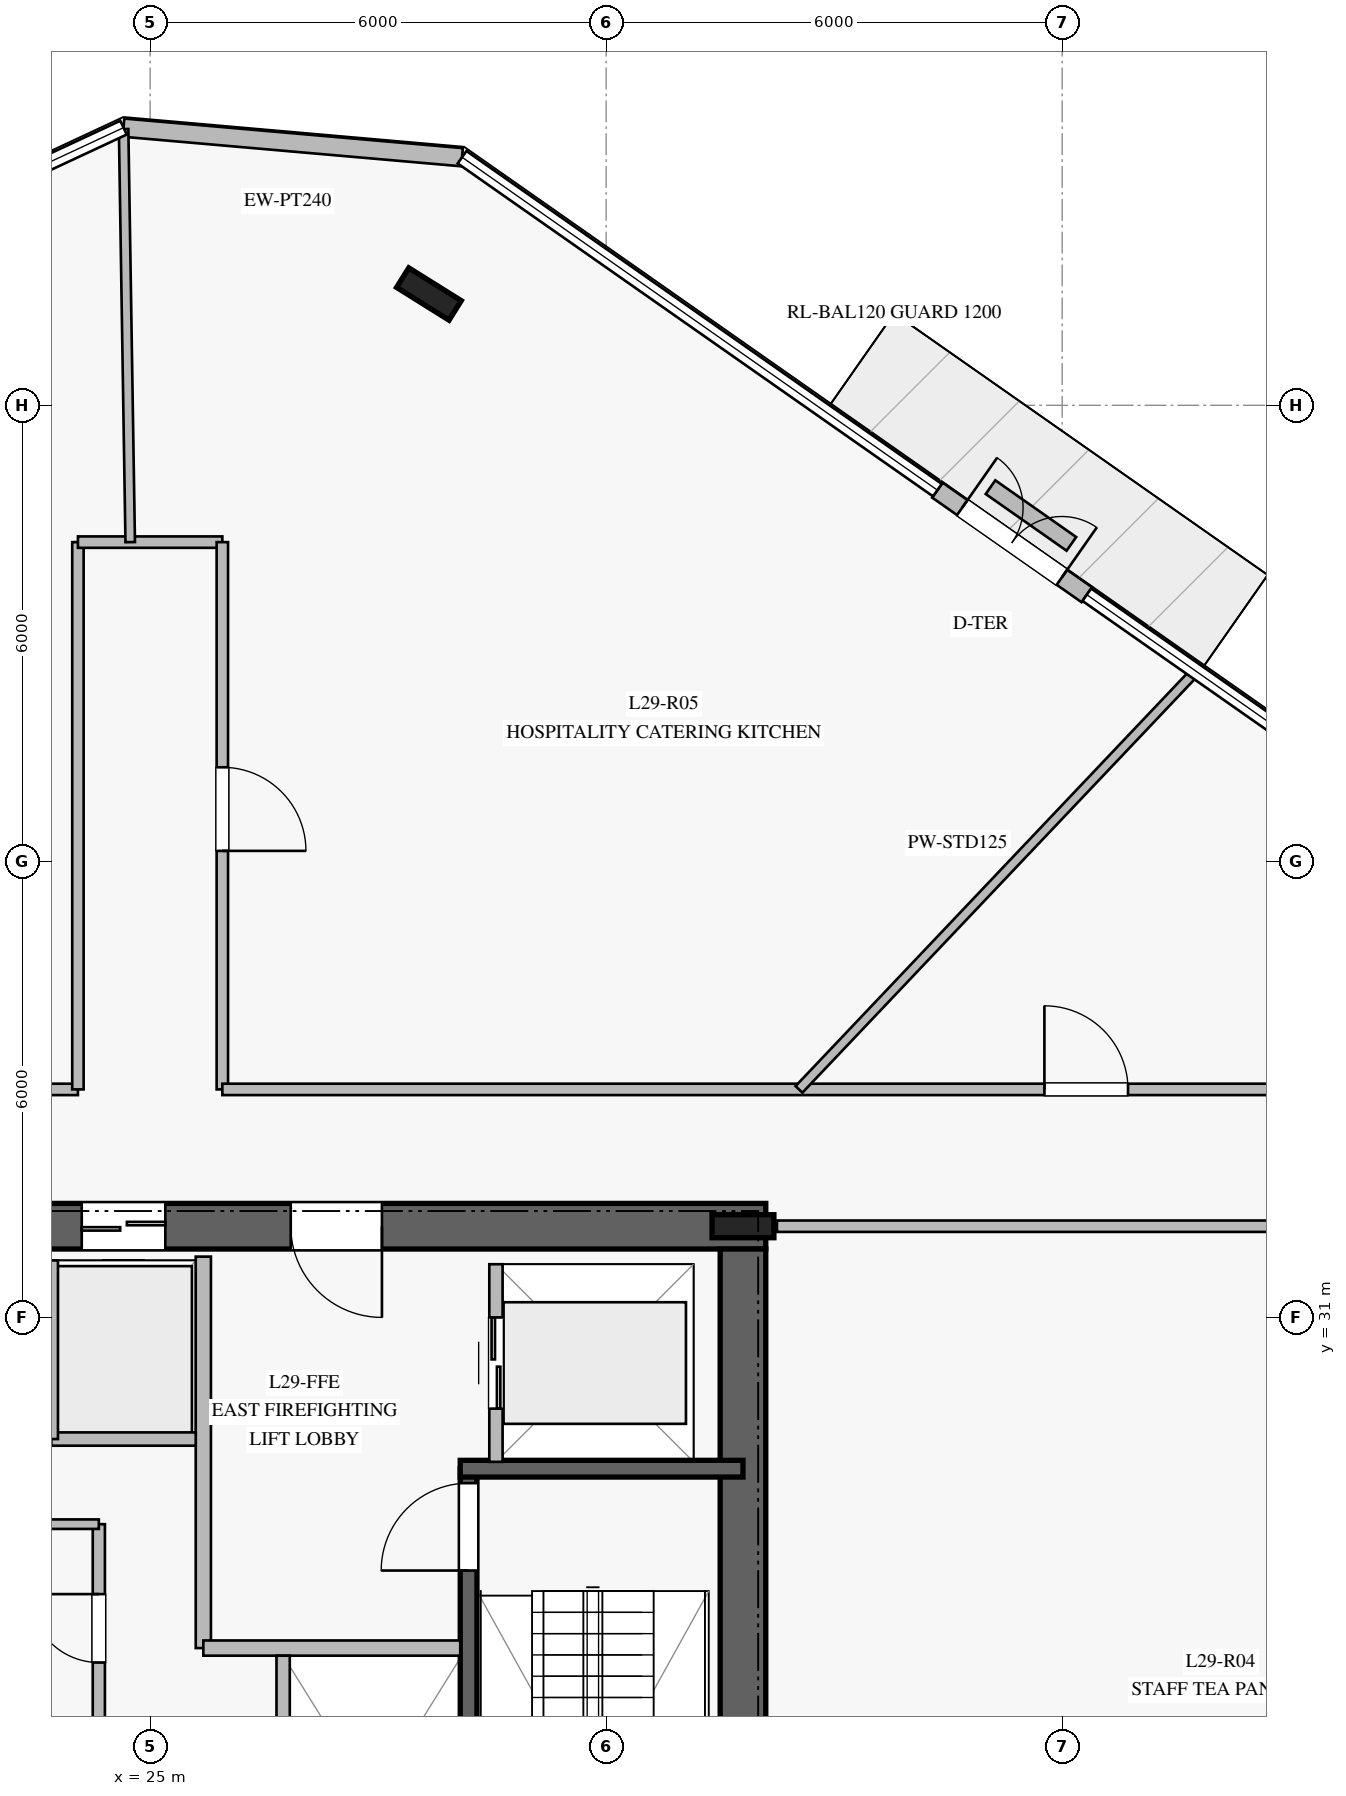
"""IFC4 building model, lengths in metres.
Left out: names, types, materials, properties, quantities, classifications, styles, units other than length and angle.
Written with IfcOpenShell. Run it as: python <this file> out.ifc"""

import sys

from ifc_helpers import new_model, si_unit, direction, frame, frame_2d, origin, origin_2d, place, context, subcontext, project, spatial, rectangle, i_section, extrude, element, fill, save


model = new_model("IFC4")
c1 = context("Model", 3, precision=1e-05, world=origin(), true_north=direction((0.0, 1.0)))
c2 = subcontext(c1, "Body", "Model", "MODEL_VIEW")
j1 = project(units=[si_unit("LENGTHUNIT", "METRE"), si_unit("PLANEANGLEUNIT", "RADIAN")], contexts=[c1])
p1 = place(None, origin())
s1 = spatial("IfcSite", under=j1, at=p1, CompositionType="ELEMENT")
p2 = place(p1, origin())
s2 = spatial("IfcBuilding", under=s1, at=p2, CompositionType="ELEMENT")
p3 = place(p2, frame((0.0, 0.0, 122.4)))
s3 = spatial("IfcBuildingStorey", under=s2, at=p3, CompositionType="ELEMENT", Elevation=122.4)
p4 = place(p3, frame((33.1, 32.2, 0.0), z_axis=(0.0, 0.0, 1.0), x_axis=(-1.0, 0.0, 0.0)))
e1 = element("IfcWall", 1, at=p4, inside=s3, PredefinedType="SHEAR", context=c2, shape_type="SweptSolid", body=[
    extrude(rectangle(XDim=16.2, YDim=0.6, at=frame_2d((8.1, 0.0))), origin(), (0.0, 0.0, 1.0), 3.76),
])
p5 = place(p4, frame((5.05, 0.0, 0.0)))
e2 = element("IfcOpeningElement", 2, at=p5, cuts=e1, PredefinedType="OPENING", context=c2, shape_type="SweptSolid", body=[
    extrude(rectangle(XDim=1.2, YDim=2.25, at=frame_2d((0.6, 1.125))), frame((0.0, 0.31, 0.0), z_axis=(0.0, -1.0, 0.0), x_axis=(1.0, 0.0, 0.0)), (0.0, 0.0, 1.0), 0.62),
])
p6 = place(p4, frame((11.85, 0.0, 0.0)))
e3 = element("IfcOpeningElement", 3, at=p6, cuts=e1, PredefinedType="OPENING", context=c2, shape_type="SweptSolid", body=[
    extrude(rectangle(XDim=1.1, YDim=2.2, at=frame_2d((0.55, 1.1))), frame((0.0, 0.31, 0.0), z_axis=(0.0, -1.0, 0.0), x_axis=(1.0, 0.0, 0.0)), (0.0, 0.0, 1.0), 0.62),
])
p7 = place(p4, frame((9.875, 0.0, 0.0)))
e4 = element("IfcOpeningElement", 4, at=p7, cuts=e1, PredefinedType="OPENING", context=c2, shape_type="SweptSolid", body=[
    extrude(rectangle(XDim=1.1, YDim=2.2, at=frame_2d((0.55, 1.1))), frame((0.0, 0.31, 0.0), z_axis=(0.0, -1.0, 0.0), x_axis=(1.0, 0.0, 0.0)), (0.0, 0.0, 1.0), 0.62),
])
p8 = place(p4, frame((7.9, 0.0, 0.0)))
e5 = element("IfcOpeningElement", 5, at=p8, cuts=e1, PredefinedType="OPENING", context=c2, shape_type="SweptSolid", body=[
    extrude(rectangle(XDim=1.1, YDim=2.2, at=frame_2d((0.55, 1.1))), frame((0.0, 0.31, 0.0), z_axis=(0.0, -1.0, 0.0), x_axis=(1.0, 0.0, 0.0)), (0.0, 0.0, 1.0), 0.62),
])
p9 = place(p3, frame((32.8, 18.1, 0.0), z_axis=(0.0, 0.0, 1.0), x_axis=(0.0, 1.0, 0.0)))
e6 = element("IfcWall", 6, at=p9, inside=s3, PredefinedType="SHEAR", context=c2, shape_type="SweptSolid", body=[
    extrude(rectangle(XDim=13.8, YDim=0.6, at=frame_2d((6.9, 0.0))), origin(), (0.0, 0.0, 1.0), 3.76),
])
p10 = place(p3, frame((32.8, 32.2, 0.0), z_axis=(0.0, 0.0, 1.0), x_axis=(1.0, 0.0, 0.0)))
e7 = element("IfcColumn", 7, at=p10, inside=s3, PredefinedType="COLUMN", context=c2, shape_type="SweptSolid", body=[
    extrude(i_section(OverallWidth=0.303, OverallDepth=0.814, WebThickness=0.021, FlangeThickness=0.04, at=origin_2d()), origin(), (0.0, 0.0, 1.0), 4.0),
])
p11 = place(p3, frame((29.19, 21.79, 0.0), z_axis=(0.0, 0.0, 1.0), x_axis=(0.0, 1.0, 0.0)))
e8 = element("IfcWall", 8, at=p11, inside=s3, PredefinedType="SOLIDWALL", context=c2, shape_type="SweptSolid", body=[
    extrude(rectangle(XDim=7.22, YDim=0.22, at=frame_2d((3.61, 0.0))), origin(), (0.0, 0.0, 1.0), 3.76),
])
p12 = place(p11, frame((5.88, 0.0, 0.0)))
e9 = element("IfcOpeningElement", 9, at=p12, cuts=e8, PredefinedType="OPENING", context=c2, shape_type="SweptSolid", body=[
    extrude(rectangle(XDim=1.15, YDim=2.2, at=frame_2d((0.575, 1.1))), frame((0.0, 0.12, 0.0), z_axis=(0.0, -1.0, 0.0), x_axis=(1.0, 0.0, 0.0)), (0.0, 0.0, 1.0), 0.24),
])
p13 = place(p3, frame((29.08, 29.01, 0.0), z_axis=(0.0, 0.0, 1.0), x_axis=(1.0, 0.0, 0.0)))
e10 = element("IfcWall", 10, at=p13, inside=s3, PredefinedType="SOLIDWALL", context=c2, shape_type="SweptSolid", body=[
    extrude(rectangle(XDim=3.72, YDim=0.22, at=frame_2d((1.86, 0.0))), origin(), (0.0, 0.0, 1.0), 3.76),
])
p14 = place(p3, frame((28.668, 44.464, 0.0), z_axis=(0.0, 0.0, 1.0), x_axis=(-0.848048096156, 0.529919264233, 0.0)))
e11 = element("IfcColumn", 11, at=p14, inside=s3, PredefinedType="COLUMN", context=c2, shape_type="SweptSolid", body=[
    extrude(i_section(OverallWidth=0.303, OverallDepth=0.814, WebThickness=0.021, FlangeThickness=0.04, at=origin_2d()), origin(), (0.0, 0.0, 1.0), 4.0),
])
p15 = place(p3, frame((37.324, 40.508, 0.0), z_axis=(0.0, 0.0, 1.0), x_axis=(-0.819284492344, 0.573387234428, 0.0)))
e12 = element("IfcWall", 12, at=p15, inside=s3, PredefinedType="STANDARD", context=c2, shape_type="SweptSolid", body=[
    extrude(rectangle(XDim=2.4, YDim=0.24, at=frame_2d((1.2, 0.0))), origin(), (0.0, 0.0, 1.0), 3.76),
])
p16 = place(p15, frame((0.4, 0.0, 0.0)))
e13 = element("IfcOpeningElement", 13, at=p16, cuts=e12, PredefinedType="OPENING", context=c2, shape_type="SweptSolid", body=[
    extrude(rectangle(XDim=1.6, YDim=2.25, at=frame_2d((0.8, 1.125))), frame((0.0, 0.13, 0.0), z_axis=(0.0, -1.0, 0.0), x_axis=(1.0, 0.0, 0.0)), (0.0, 0.0, 1.0), 0.26),
])
p17 = place(p3, frame((29.104, 46.264, 0.0), z_axis=(0.0, 0.0, 1.0), x_axis=(-0.996204852099, 0.087039603938, 0.0)))
e14 = element("IfcWall", 14, at=p17, inside=s3, PredefinedType="STANDARD", context=c2, shape_type="SweptSolid", body=[
    extrude(rectangle(XDim=4.471, YDim=0.24, at=frame_2d((2.236, 0.0))), origin(), (0.0, 0.0, 1.0), 3.76),
])
p18 = place(p3, frame((37.121, 41.177, 0.0), z_axis=(0.0, 0.0, 1.0), x_axis=(-0.818816934098, 0.574054725993, 0.0)))
e15 = element("IfcWall", 15, at=p18, inside=s3, PredefinedType="USERDEFINED", context=c2, shape_type="SweptSolid", body=[
    extrude(rectangle(XDim=1.3, YDim=0.22, at=frame_2d((0.65, 0.0))), origin(), (0.0, 0.0, 1.0), 0.4),
])
p19 = place(p3, frame((25.7, 26.65, 0.0), z_axis=(0.0, 0.0, 1.0), x_axis=(0.0, 1.0, 0.0)))
e16 = element("IfcWall", 16, at=p19, inside=s3, PredefinedType="PARTITIONING", context=c2, shape_type="SweptSolid", body=[
    extrude(rectangle(XDim=5.15, YDim=0.2, at=frame_2d((2.575, 0.0))), origin(), (0.0, 0.0, 1.0), 3.76),
])
p20 = place(p3, frame((25.7, 26.65, 0.0), z_axis=(0.0, 0.0, 1.0), x_axis=(1.0, 0.0, 0.0)))
e17 = element("IfcWall", 17, at=p20, inside=s3, PredefinedType="PARTITIONING", context=c2, shape_type="SweptSolid", body=[
    extrude(rectangle(XDim=3.38, YDim=0.2, at=frame_2d((1.69, 0.0))), origin(), (0.0, 0.0, 1.0), 3.76),
])
p21 = place(p3, frame((24.325, 23.35, 0.0), z_axis=(0.0, 0.0, 1.0), x_axis=(0.0, 1.0, 0.0)))
e18 = element("IfcWall", 18, at=p21, inside=s3, PredefinedType="PLUMBINGWALL", context=c2, shape_type="SweptSolid", body=[
    extrude(rectangle(XDim=4.93, YDim=0.16, at=frame_2d((2.465, 0.0))), origin(), (0.0, 0.0, 1.0), 3.76),
])
p22 = place(p21, frame((0.65, 0.0, 0.0)))
e19 = element("IfcOpeningElement", 19, at=p22, cuts=e18, PredefinedType="OPENING", context=c2, shape_type="SweptSolid", body=[
    extrude(rectangle(XDim=0.95, YDim=2.1, at=frame_2d((0.475, 1.05))), frame((0.0, 0.09, 0.0), z_axis=(0.0, -1.0, 0.0), x_axis=(1.0, 0.0, 0.0)), (0.0, 0.0, 1.0), 0.18),
])
p23 = place(p21, frame((3.11, 0.0, 0.0)))
e20 = element("IfcOpeningElement", 20, at=p23, cuts=e18, PredefinedType="OPENING", context=c2, shape_type="SweptSolid", body=[
    extrude(rectangle(XDim=0.9, YDim=2.1, at=frame_2d((0.45, 1.05))), frame((0.0, 0.09, 0.0), z_axis=(0.0, -1.0, 0.0), x_axis=(1.0, 0.0, 0.0)), (0.0, 0.0, 1.0), 0.18),
])
p24 = place(p3, frame((20.92, 28.28, 0.0), z_axis=(0.0, 0.0, 1.0), x_axis=(1.0, 0.0, 0.0)))
e21 = element("IfcWall", 21, at=p24, inside=s3, PredefinedType="PARTITIONING", context=c2, shape_type="SweptSolid", body=[
    extrude(rectangle(XDim=3.405, YDim=0.125, at=frame_2d((1.703, 0.0))), origin(), (0.0, 0.0, 1.0), 3.76),
])
p25 = place(p24, frame((0.255, 0.0, 0.0)))
e22 = element("IfcOpeningElement", 22, at=p25, cuts=e21, PredefinedType="OPENING", context=c2, shape_type="SweptSolid", body=[
    extrude(rectangle(XDim=1.0, YDim=2.15, at=frame_2d((0.5, 1.075))), frame((0.0, 0.073, 0.0), z_axis=(0.0, -1.0, 0.0), x_axis=(1.0, 0.0, 0.0)), (0.0, 0.0, 1.0), 0.145),
])
p26 = place(p3, frame((23.7, 29.4, 0.0), z_axis=(0.0, 0.0, 1.0), x_axis=(1.0, 0.0, 0.0)))
e23 = element("IfcWall", 23, at=p26, inside=s3, PredefinedType="PARTITIONING", context=c2, shape_type="SweptSolid", body=[
    extrude(rectangle(XDim=1.9, YDim=0.175, at=frame_2d((0.95, 0.0))), origin(), (0.0, 0.0, 1.0), 3.76),
])
p27 = place(p3, frame((23.7, 29.4, 0.0), z_axis=(0.0, 0.0, 1.0), x_axis=(0.0, 1.0, 0.0)))
e24 = element("IfcWall", 24, at=p27, inside=s3, PredefinedType="PARTITIONING", context=c2, shape_type="SweptSolid", body=[
    extrude(rectangle(XDim=2.35, YDim=0.175, at=frame_2d((1.175, 0.0))), origin(), (0.0, 0.0, 1.0), 3.76),
])
p28 = place(p3, frame((26.75, 24.65, 0.0), z_axis=(0.0, 0.0, 1.0), x_axis=(0.0, 1.0, 0.0)))
e25 = element("IfcWall", 25, at=p28, inside=s3, PredefinedType="PARTITIONING", context=c2, shape_type="SweptSolid", body=[
    extrude(rectangle(XDim=1.9, YDim=0.175, at=frame_2d((0.95, 0.0))), origin(), (0.0, 0.0, 1.0), 3.76),
])
p29 = place(p3, frame((29.55, 29.1, 0.0), z_axis=(0.0, 0.0, 1.0), x_axis=(0.0, 1.0, 0.0)))
e26 = element("IfcWall", 26, at=p29, inside=s3, PredefinedType="PARTITIONING", context=c2, shape_type="SweptSolid", body=[
    extrude(rectangle(XDim=2.6, YDim=0.175, at=frame_2d((1.3, 0.0))), origin(), (0.0, 0.0, 1.0), 3.76),
])
p30 = place(p29, frame((0.7, 0.0, 0.0)))
e27 = element("IfcOpeningElement", 27, at=p30, cuts=e26, PredefinedType="OPENING", context=c2, shape_type="SweptSolid", body=[
    extrude(rectangle(XDim=1.2, YDim=2.2, at=frame_2d((0.6, 1.1))), frame((0.0, 0.098, 0.0), z_axis=(0.0, -1.0, 0.0), x_axis=(1.0, 0.0, 0.0)), (0.0, 0.0, 1.0), 0.195),
])
p31 = place(p3, frame((17.2, 34.0, 0.0), z_axis=(0.0, 0.0, 1.0), x_axis=(1.0, 0.0, 0.0)))
e28 = element("IfcWall", 28, at=p31, inside=s3, PredefinedType="PARTITIONING", context=c2, shape_type="SweptSolid", body=[
    extrude(rectangle(XDim=6.85, YDim=0.15, at=frame_2d((3.425, 0.0))), origin(), (0.0, 0.0, 1.0), 3.21),
])
p32 = place(p3, frame((24.05, 34.0, 0.0), z_axis=(0.0, 0.0, 1.0), x_axis=(0.0, 1.0, 0.0)))
e29 = element("IfcWall", 29, at=p32, inside=s3, PredefinedType="PARTITIONING", context=c2, shape_type="SweptSolid", body=[
    extrude(rectangle(XDim=7.2, YDim=0.15, at=frame_2d((3.6, 0.0))), origin(), (0.0, 0.0, 1.0), 3.36),
])
p33 = place(p3, frame((24.05, 41.2, 0.0), z_axis=(0.0, 0.0, 1.0), x_axis=(1.0, 0.0, 0.0)))
e30 = element("IfcWall", 30, at=p33, inside=s3, PredefinedType="PARTITIONING", context=c2, shape_type="SweptSolid", body=[
    extrude(rectangle(XDim=1.9, YDim=0.15, at=frame_2d((0.95, 0.0))), origin(), (0.0, 0.0, 1.0), 3.76),
])
p34 = place(p3, frame((25.95, 41.2, 0.0), z_axis=(0.0, 0.0, 1.0), x_axis=(0.0, -1.0, 0.0)))
e31 = element("IfcWall", 31, at=p34, inside=s3, PredefinedType="PARTITIONING", context=c2, shape_type="SweptSolid", body=[
    extrude(rectangle(XDim=7.2, YDim=0.15, at=frame_2d((3.6, 0.0))), origin(), (0.0, 0.0, 1.0), 3.36),
])
p35 = place(p34, frame((2.962, 0.0, 0.0)))
e32 = element("IfcOpeningElement", 32, at=p35, cuts=e31, PredefinedType="OPENING", context=c2, shape_type="SweptSolid", body=[
    extrude(rectangle(XDim=1.1, YDim=2.2, at=frame_2d((0.55, 1.1))), frame((0.0, 0.085, 0.0), z_axis=(0.0, -1.0, 0.0), x_axis=(1.0, 0.0, 0.0)), (0.0, 0.0, 1.0), 0.17),
])
p36 = place(p3, frame((25.95, 34.0, 0.0), z_axis=(0.0, 0.0, 1.0), x_axis=(1.0, 0.0, 0.0)))
e33 = element("IfcWall", 33, at=p36, inside=s3, PredefinedType="PARTITIONING", context=c2, shape_type="SweptSolid", body=[
    extrude(rectangle(XDim=15.25, YDim=0.15, at=frame_2d((7.625, 0.0))), origin(), (0.0, 0.0, 1.0), 3.21),
])
p37 = place(p36, frame((10.816, 0.0, 0.0)))
e34 = element("IfcOpeningElement", 34, at=p37, cuts=e33, PredefinedType="OPENING", context=c2, shape_type="SweptSolid", body=[
    extrude(rectangle(XDim=1.1, YDim=2.2, at=frame_2d((0.55, 1.1))), frame((0.0, 0.085, 0.0), z_axis=(0.0, -1.0, 0.0), x_axis=(1.0, 0.0, 0.0)), (0.0, 0.0, 1.0), 0.17),
])
p38 = place(p3, frame((41.2, 32.2, 0.0), z_axis=(0.0, 0.0, 1.0), x_axis=(-1.0, 0.0, 0.0)))
e35 = element("IfcWall", 35, at=p38, inside=s3, PredefinedType="PARTITIONING", context=c2, shape_type="SweptSolid", body=[
    extrude(rectangle(XDim=7.953, YDim=0.15, at=frame_2d((3.977, 0.0))), origin(), (0.0, 0.0, 1.0), 3.21),
])
p39 = place(p3, frame((33.537, 34.0, 0.0), z_axis=(0.0, 0.0, 1.0), x_axis=(0.68823300749, 0.725489715572, 0.0)))
e36 = element("IfcWall", 36, at=p39, inside=s3, PredefinedType="PARTITIONING", context=c2, shape_type="SweptSolid", body=[
    extrude(rectangle(XDim=7.569, YDim=0.125, at=frame_2d((3.784, 0.0))), origin(), (0.0, 0.0, 1.0), 3.02),
])
p40 = place(p3, frame((24.738, 41.2, 0.0), z_axis=(0.0, 0.0, 1.0), x_axis=(-0.016037114242, 0.999871397214, 0.0)))
e37 = element("IfcWall", 37, at=p40, inside=s3, PredefinedType="PARTITIONING", context=c2, shape_type="SweptSolid", body=[
    extrude(rectangle(XDim=5.435, YDim=0.125, at=frame_2d((2.717, 0.0))), origin(), (0.0, 0.0, 1.0), 3.16),
])
p41 = place(p16, frame((1.6, 0.0, 0.0), z_axis=(0.0, 0.0, 1.0), x_axis=(-1.0, 0.0, 0.0)))
e38 = element("IfcDoor", 38, at=p41, inside=s3, OperationType="DOUBLE_DOOR_SINGLE_SWING", PredefinedType="DOOR", context=c2, shape_type="SweptSolid", body=[
    extrude(rectangle(XDim=1.6, YDim=2.25, at=frame_2d((0.8, 1.125))), frame((0.0, 0.025, 0.0), z_axis=(0.0, -1.0, 0.0), x_axis=(1.0, 0.0, 0.0)), (0.0, 0.0, 1.0), 0.05),
])
fill(e13, e38)
p42 = place(p12, origin())
e39 = element("IfcDoor", 39, at=p42, inside=s3, OperationType="SINGLE_SWING_LEFT", PredefinedType="DOOR", context=c2, shape_type="SweptSolid", body=[
    extrude(rectangle(XDim=1.15, YDim=2.2, at=frame_2d((0.575, 1.1))), frame((0.0, 0.025, 0.0), z_axis=(0.0, -1.0, 0.0), x_axis=(1.0, 0.0, 0.0)), (0.0, 0.0, 1.0), 0.05),
])
fill(e9, e39)
p43 = place(p5, origin())
e40 = element("IfcDoor", 40, at=p43, inside=s3, OperationType="SINGLE_SWING_LEFT", PredefinedType="DOOR", context=c2, shape_type="SweptSolid", body=[
    extrude(rectangle(XDim=1.2, YDim=2.25, at=frame_2d((0.6, 1.125))), frame((0.0, 0.025, 0.0), z_axis=(0.0, -1.0, 0.0), x_axis=(1.0, 0.0, 0.0)), (0.0, 0.0, 1.0), 0.05),
])
fill(e2, e40)
p44 = place(p23, origin())
e41 = element("IfcDoor", 41, at=p44, inside=s3, OperationType="SINGLE_SWING_RIGHT", PredefinedType="DOOR", context=c2, shape_type="SweptSolid", body=[
    extrude(rectangle(XDim=0.9, YDim=2.1, at=frame_2d((0.45, 1.05))), frame((0.0, 0.025, 0.0), z_axis=(0.0, -1.0, 0.0), x_axis=(1.0, 0.0, 0.0)), (0.0, 0.0, 1.0), 0.05),
])
fill(e20, e41)
p45 = place(p8, origin())
e42 = element("IfcDoor", 42, at=p45, inside=s3, OperationType="DOUBLE_DOOR_SLIDING", PredefinedType="DOOR", context=c2, shape_type="SweptSolid", body=[
    extrude(rectangle(XDim=1.1, YDim=2.2, at=frame_2d((0.55, 1.1))), frame((0.0, 0.025, 0.0), z_axis=(0.0, -1.0, 0.0), x_axis=(1.0, 0.0, 0.0)), (0.0, 0.0, 1.0), 0.05),
])
fill(e5, e42)
p46 = place(p30, origin())
e43 = element("IfcDoor", 43, at=p46, inside=s3, OperationType="DOUBLE_DOOR_SLIDING", PredefinedType="DOOR", context=c2, shape_type="SweptSolid", body=[
    extrude(rectangle(XDim=1.2, YDim=2.2, at=frame_2d((0.6, 1.1))), frame((0.0, 0.025, 0.0), z_axis=(0.0, -1.0, 0.0), x_axis=(1.0, 0.0, 0.0)), (0.0, 0.0, 1.0), 0.05),
])
fill(e27, e43)
p47 = place(p37, origin())
e44 = element("IfcDoor", 44, at=p47, inside=s3, OperationType="SINGLE_SWING_LEFT", PredefinedType="DOOR", context=c2, shape_type="SweptSolid", body=[
    extrude(rectangle(XDim=1.1, YDim=2.2, at=frame_2d((0.55, 1.1))), frame((0.0, 0.025, 0.0), z_axis=(0.0, -1.0, 0.0), x_axis=(1.0, 0.0, 0.0)), (0.0, 0.0, 1.0), 0.05),
])
fill(e34, e44)
p48 = place(p35, origin())
e45 = element("IfcDoor", 45, at=p48, inside=s3, OperationType="SINGLE_SWING_RIGHT", PredefinedType="DOOR", context=c2, shape_type="SweptSolid", body=[
    extrude(rectangle(XDim=1.1, YDim=2.2, at=frame_2d((0.55, 1.1))), frame((0.0, 0.025, 0.0), z_axis=(0.0, -1.0, 0.0), x_axis=(1.0, 0.0, 0.0)), (0.0, 0.0, 1.0), 0.05),
])
fill(e32, e45)
save(model, sys.argv[1])
